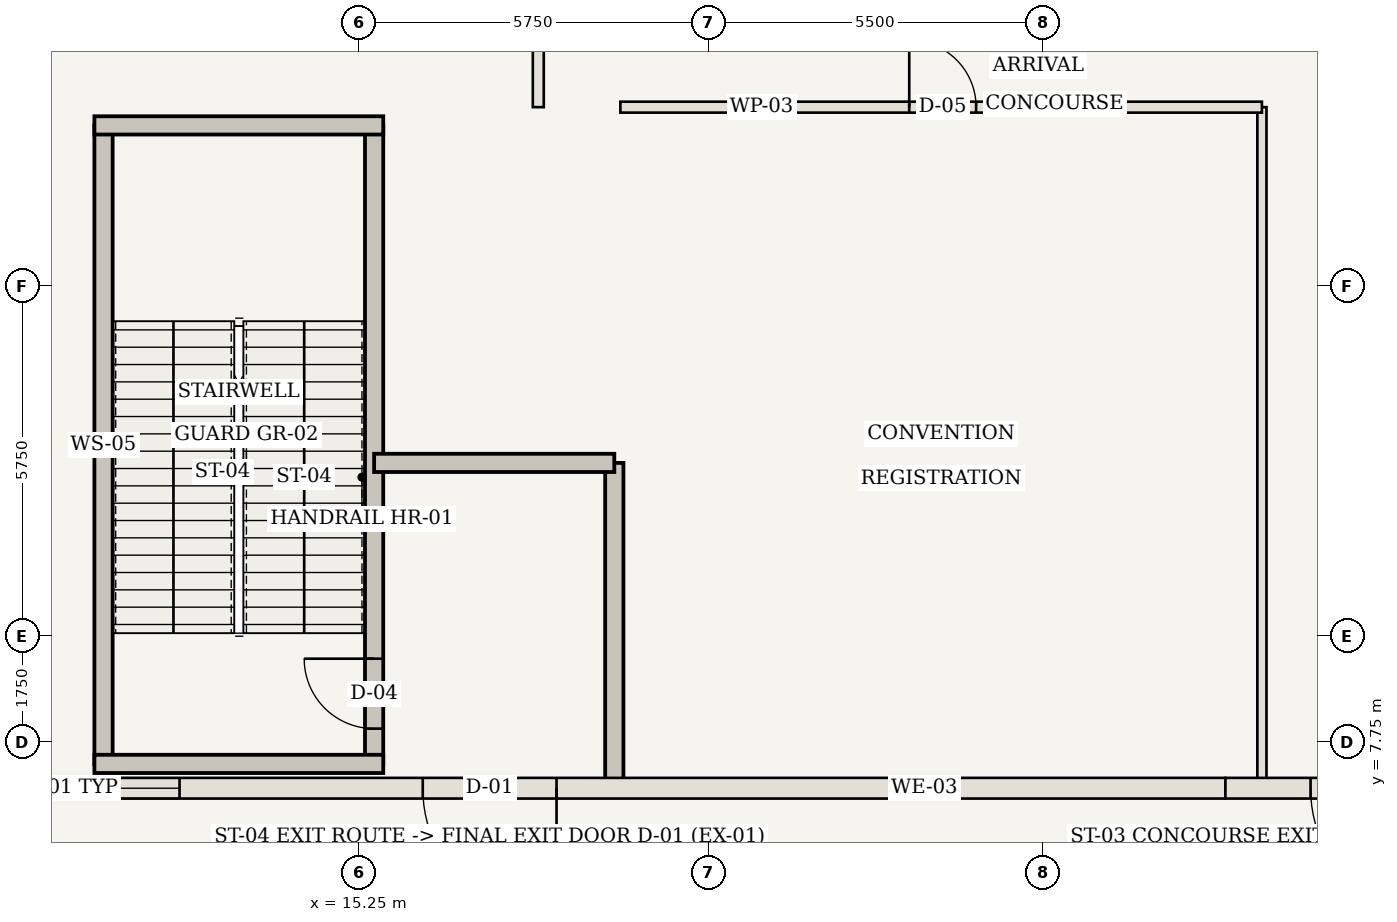
"""IFC4 building model, lengths in metres.
Left out: names, types, materials, properties, quantities, classifications, styles, units other than length and angle.
Written with IfcOpenShell. Run it as: python <this file> out.ifc"""

import sys

from ifc_helpers import new_model, si_unit, direction, frame, frame_2d, origin, place, context, subcontext, project, spatial, rectangle, extrude, element, fill, save


model = new_model("IFC4")
c1 = context("Model", 3, precision=1e-05, world=origin(), true_north=direction((0.0, 1.0)))
c2 = subcontext(c1, "Body", "Model", "MODEL_VIEW")
j1 = project(units=[si_unit("LENGTHUNIT", "METRE"), si_unit("PLANEANGLEUNIT", "RADIAN")], contexts=[c1])
p1 = place(None, origin())
s1 = spatial("IfcSite", under=j1, at=p1, CompositionType="ELEMENT")
p2 = place(p1, origin())
s2 = spatial("IfcBuilding", under=s1, at=p2, CompositionType="ELEMENT")
p3 = place(p2, origin())
s3 = spatial("IfcBuildingStorey", under=s2, at=p3, CompositionType="ELEMENT", Elevation=0.0)
p4 = place(p3, frame((11.05, 7.4, 0.0), z_axis=(0.0, 0.0, 1.0), x_axis=(0.0, 1.0, 0.0)))
e1 = element("IfcWall", 1, at=p4, inside=s3, PredefinedType="SHEAR", context=c2, shape_type="SweptSolid", body=[
    extrude(rectangle(XDim=10.5, YDim=0.3, at=frame_2d((5.25, 0.0))), origin(), (0.0, 0.0, 1.0), 6.41),
])
p5 = place(p3, frame((15.5, 7.4, 0.0), z_axis=(0.0, 0.0, 1.0), x_axis=(0.0, 1.0, 0.0)))
e2 = element("IfcWall", 2, at=p5, inside=s3, PredefinedType="SHEAR", context=c2, shape_type="SweptSolid", body=[
    extrude(rectangle(XDim=10.5, YDim=0.3, at=frame_2d((5.25, 0.0))), origin(), (0.0, 0.0, 1.0), 6.41),
])
p6 = place(p5, frame((0.58, 0.0, 0.0)))
e3 = element("IfcOpeningElement", 3, at=p6, cuts=e2, PredefinedType="OPENING", context=c2, shape_type="SweptSolid", body=[
    extrude(rectangle(XDim=1.15, YDim=2.15, at=frame_2d((0.575, 1.075))), frame((0.0, 0.16, 0.0), z_axis=(0.0, -1.0, 0.0), x_axis=(1.0, 0.0, 0.0)), (0.0, 0.0, 1.0), 0.32),
])
for number, where, z_axis, x_axis in (
    (4, (10.9, 7.4, 0.0), (0.0, 0.0, 1.0), (1.0, 0.0, 0.0)),
    (5, (10.9, 17.9, 0.0), (0.0, 0.0, 1.0), (1.0, 0.0, 0.0)),
):
    element("IfcWall", number, at=place(p3, frame(where, z_axis=z_axis, x_axis=x_axis)), inside=s3, PredefinedType="SHEAR", context=c2, shape_type="SweptSolid", body=[
        extrude(rectangle(XDim=4.75, YDim=0.3, at=frame_2d((2.375, 0.0))), origin(), (0.0, 0.0, 1.0), 6.41),
    ])
p7 = place(p3, frame((19.45, 7.05, 0.0), z_axis=(0.0, 0.0, 1.0), x_axis=(0.0, 1.0, 0.0)))
e6 = element("IfcWall", 6, at=p7, inside=s3, PredefinedType="SHEAR", context=c2, shape_type="SweptSolid", body=[
    extrude(rectangle(XDim=5.3, YDim=0.3, at=frame_2d((2.65, 0.0))), origin(), (0.0, 0.0, 1.0), 6.41),
])
p8 = place(p3, frame((15.5, 12.35, 0.0), z_axis=(0.0, 0.0, 1.0), x_axis=(1.0, 0.0, 0.0)))
e7 = element("IfcWall", 7, at=p8, inside=s3, PredefinedType="SHEAR", context=c2, shape_type="SweptSolid", body=[
    extrude(rectangle(XDim=3.95, YDim=0.3, at=frame_2d((1.975, 0.0))), origin(), (0.0, 0.0, 1.0), 6.41),
])
p9 = place(p3, frame((30.1, 7.1, 0.0), z_axis=(0.0, 0.0, 1.0), x_axis=(0.0, 1.0, 0.0)))
e8 = element("IfcWall", 8, at=p9, inside=s3, PredefinedType="STANDARD", context=c2, shape_type="SweptSolid", body=[
    extrude(rectangle(XDim=11.1, YDim=0.15, at=frame_2d((5.55, 0.0))), origin(), (0.0, 0.0, 1.0), 6.41),
])
p10 = place(p3, frame((19.55, 18.2, 0.0), z_axis=(0.0, 0.0, 1.0), x_axis=(1.0, 0.0, 0.0)))
e9 = element("IfcWall", 9, at=p10, inside=s3, PredefinedType="STANDARD", context=c2, shape_type="SweptSolid", body=[
    extrude(rectangle(XDim=10.55, YDim=0.18, at=frame_2d((5.275, 0.0))), origin(), (0.0, 0.0, 1.0), 6.41),
])
p11 = place(p10, frame((4.75, 0.0, 0.0)))
e10 = element("IfcOpeningElement", 10, at=p11, cuts=e9, PredefinedType="OPENING", context=c2, shape_type="SweptSolid", body=[
    extrude(rectangle(XDim=1.1, YDim=2.15, at=frame_2d((0.55, 1.075))), frame((0.0, 0.1, 0.0), z_axis=(0.0, -1.0, 0.0), x_axis=(1.0, 0.0, 0.0)), (0.0, 0.0, 1.0), 0.2),
])
p12 = place(p3, frame((18.2, 18.2, 0.0), z_axis=(0.0, 0.0, 1.0), x_axis=(0.0, 1.0, 0.0)))
e11 = element("IfcWall", 11, at=p12, inside=s3, PredefinedType="STANDARD", context=c2, shape_type="SweptSolid", body=[
    extrude(rectangle(XDim=12.5, YDim=0.18, at=frame_2d((6.25, 0.0))), origin(), (0.0, 0.0, 1.0), 6.41),
])
p13 = place(p12, frame((5.75, 0.0, 0.0)))
e12 = element("IfcOpeningElement", 12, at=p13, cuts=e11, PredefinedType="OPENING", context=c2, shape_type="SweptSolid", body=[
    extrude(rectangle(XDim=0.95, YDim=2.15, at=frame_2d((0.475, 1.075))), frame((0.0, 0.1, 0.0), z_axis=(0.0, -1.0, 0.0), x_axis=(1.0, 0.0, 0.0)), (0.0, 0.0, 1.0), 0.2),
])
p14 = place(p3, frame((29.5, 7.0, 0.0), z_axis=(0.0, 0.0, 1.0), x_axis=(-1.0, 0.0, 0.0)))
e13 = element("IfcWall", 13, at=p14, inside=s3, PredefinedType="USERDEFINED", context=c2, shape_type="SweptSolid", body=[
    extrude(rectangle(XDim=22.5, YDim=0.34, at=frame_2d((11.25, 0.0))), origin(), (0.0, 0.0, 1.0), 5.51),
])
p15 = place(p14, frame((11.0, 0.0, 0.0)))
e14 = element("IfcOpeningElement", 14, at=p15, cuts=e13, PredefinedType="OPENING", context=c2, shape_type="SweptSolid", body=[
    extrude(rectangle(XDim=2.2, YDim=2.4, at=frame_2d((1.1, 1.2))), frame((0.0, 0.18, 0.0), z_axis=(0.0, -1.0, 0.0), x_axis=(1.0, 0.0, 0.0)), (0.0, 0.0, 1.0), 0.36),
])
p16 = place(p14, frame((17.2, 0.0, 0.9)))
e15 = element("IfcOpeningElement", 15, at=p16, cuts=e13, PredefinedType="OPENING", context=c2, shape_type="SweptSolid", body=[
    extrude(rectangle(XDim=3.6, YDim=2.6, at=frame_2d((1.8, 1.3))), frame((0.0, 0.18, 0.0), z_axis=(0.0, -1.0, 0.0), x_axis=(1.0, 0.0, 0.0)), (0.0, 0.0, 1.0), 0.36),
])
p17 = place(p3, frame((34.5, 7.0, 0.0), z_axis=(0.0, 0.0, 1.0), x_axis=(-1.0, 0.0, 0.0)))
e16 = element("IfcWall", 16, at=p17, inside=s3, PredefinedType="USERDEFINED", context=c2, shape_type="SweptSolid", body=[
    extrude(rectangle(XDim=5.0, YDim=0.34, at=frame_2d((2.5, 0.0))), origin(), (0.0, 0.0, 1.0), 5.51),
])
p18 = place(p17, frame((1.4, 0.0, 0.0)))
e17 = element("IfcOpeningElement", 17, at=p18, cuts=e16, PredefinedType="OPENING", context=c2, shape_type="SweptSolid", body=[
    extrude(rectangle(XDim=2.2, YDim=2.4, at=frame_2d((1.1, 1.2))), frame((0.0, 0.18, 0.0), z_axis=(0.0, -1.0, 0.0), x_axis=(1.0, 0.0, 0.0)), (0.0, 0.0, 1.0), 0.36),
])
p19 = place(p6, origin())
e18 = element("IfcDoor", 18, at=p19, inside=s3, OperationType="SINGLE_SWING_RIGHT", PredefinedType="DOOR", context=c2, shape_type="SweptSolid", body=[
    extrude(rectangle(XDim=1.15, YDim=2.15, at=frame_2d((0.575, 1.075))), frame((0.0, 0.025, 0.0), z_axis=(0.0, -1.0, 0.0), x_axis=(1.0, 0.0, 0.0)), (0.0, 0.0, 1.0), 0.05),
])
fill(e3, e18)
p20 = place(p11, origin())
e19 = element("IfcDoor", 19, at=p20, inside=s3, OperationType="SINGLE_SWING_LEFT", PredefinedType="DOOR", context=c2, shape_type="SweptSolid", body=[
    extrude(rectangle(XDim=1.1, YDim=2.15, at=frame_2d((0.55, 1.075))), frame((0.0, 0.025, 0.0), z_axis=(0.0, -1.0, 0.0), x_axis=(1.0, 0.0, 0.0)), (0.0, 0.0, 1.0), 0.05),
])
fill(e10, e19)
p21 = place(p15, origin())
e20 = element("IfcDoor", 20, at=p21, inside=s3, OperationType="DOUBLE_DOOR_SINGLE_SWING", PredefinedType="DOOR", context=c2, shape_type="SweptSolid", body=[
    extrude(rectangle(XDim=2.2, YDim=2.4, at=frame_2d((1.1, 1.2))), frame((0.0, 0.025, 0.0), z_axis=(0.0, -1.0, 0.0), x_axis=(1.0, 0.0, 0.0)), (0.0, 0.0, 1.0), 0.05),
])
fill(e14, e20)
p22 = place(p16, origin())
e21 = element("IfcWindow", 21, at=p22, inside=s3, PartitioningType="SINGLE_PANEL", PredefinedType="WINDOW", context=c2, shape_type="SweptSolid", body=[
    extrude(rectangle(XDim=3.6, YDim=2.6, at=frame_2d((1.8, 1.3))), frame((0.0, 0.03, 0.0), z_axis=(0.0, -1.0, 0.0), x_axis=(1.0, 0.0, 0.0)), (0.0, 0.0, 1.0), 0.06),
])
fill(e15, e21)
p23 = place(p18, origin())
e22 = element("IfcDoor", 22, at=p23, inside=s3, OperationType="DOUBLE_DOOR_SINGLE_SWING", PredefinedType="DOOR", context=c2, shape_type="SweptSolid", body=[
    extrude(rectangle(XDim=2.2, YDim=2.4, at=frame_2d((1.1, 1.2))), frame((0.0, 0.025, 0.0), z_axis=(0.0, -1.0, 0.0), x_axis=(1.0, 0.0, 0.0)), (0.0, 0.0, 1.0), 0.05),
])
fill(e17, e22)
save(model, sys.argv[1])
